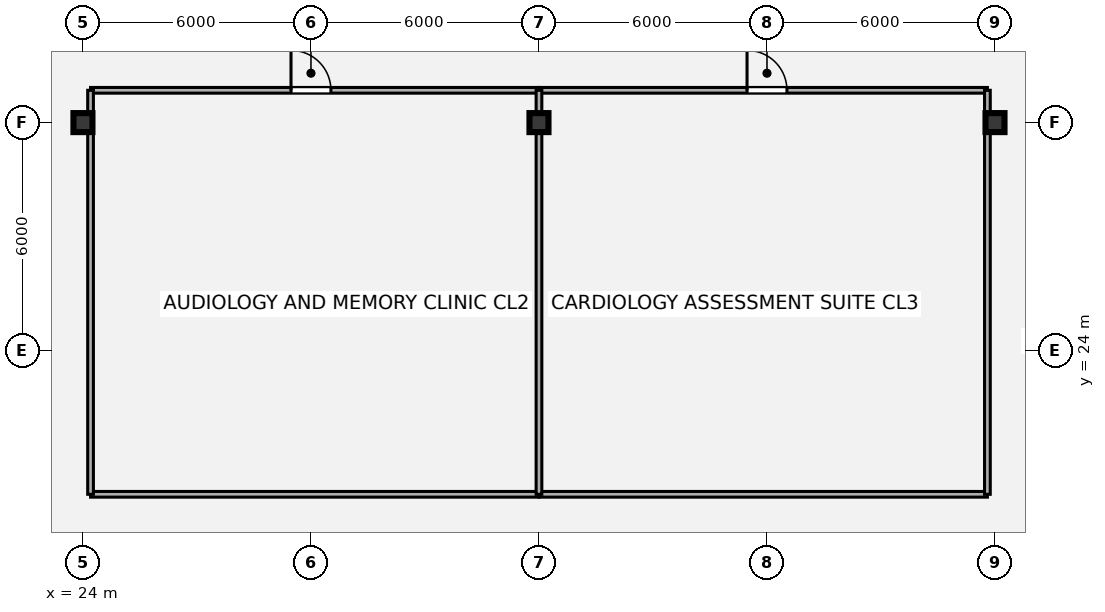
"""IFC4 building model, lengths in metres.
Left out: names, types, materials, properties, quantities, classifications, styles, units other than length and angle.
Written with IfcOpenShell. Run it as: python <this file> out.ifc"""

import sys

from ifc_helpers import new_model, si_unit, direction, frame, frame_2d, origin, origin_2d, place, context, subcontext, project, spatial, rectangle, i_section, extrude, source, transform, mapped, element, fill, save


model = new_model("IFC4")
c1 = context("Model", 3, precision=1e-05, world=origin(), true_north=direction((0.0, 1.0)))
c2 = subcontext(c1, "Body", "Model", "MODEL_VIEW")
j1 = project(units=[si_unit("LENGTHUNIT", "METRE"), si_unit("PLANEANGLEUNIT", "RADIAN")], contexts=[c1])
p1 = place(None, origin())
s1 = spatial("IfcSite", under=j1, at=p1, CompositionType="ELEMENT")
p2 = place(p1, origin())
s2 = spatial("IfcBuilding", under=s1, at=p2, CompositionType="ELEMENT")
p3 = place(p2, frame((0.0, 0.0, 5.4)))
s3 = spatial("IfcBuildingStorey", under=s2, at=p3, CompositionType="ELEMENT", Elevation=5.4)
m1 = source(origin(), c2, "Body", "SweptSolid", [
    extrude(i_section(OverallWidth=0.5, OverallDepth=0.5, WebThickness=0.028, FlangeThickness=0.045, at=origin_2d()), origin(), (0.0, 0.0, 1.0), 4.32),
])
for number, where, z_axis, x_axis in (
    (1, (24.0, 30.0, 0.0), (0.0, 0.0, 1.0), (1.0, 0.0, 0.0)),
    (2, (36.0, 30.0, 0.0), (0.0, 0.0, 1.0), (1.0, 0.0, 0.0)),
    (3, (48.0, 30.0, 0.0), (0.0, 0.0, 1.0), (1.0, 0.0, 0.0)),
):
    element("IfcColumn", number, at=place(p3, frame(where, z_axis=z_axis, x_axis=x_axis)), inside=s3, PredefinedType="COLUMN", context=c2, shape_type="MappedRepresentation", body=[
        mapped(m1, transform((0.0, 0.0, 0.0), x_axis=(1.0, 0.0, 0.0), y_axis=(0.0, 1.0, 0.0), z_axis=(0.0, 0.0, 1.0), scale=1.0)),
    ])
for number, where, z_axis, x_axis in (
    (4, (24.2, 20.22, 0.0), (0.0, 0.0, 1.0), (1.0, 0.0, 0.0)),
    (5, (36.0, 20.22, 0.0), (0.0, 0.0, 1.0), (1.0, 0.0, 0.0)),
):
    element("IfcWall", number, at=place(p3, frame(where, z_axis=z_axis, x_axis=x_axis)), inside=s3, PredefinedType="PARTITIONING", context=c2, shape_type="SweptSolid", body=[
        extrude(rectangle(XDim=11.8, YDim=0.15, at=frame_2d((5.9, 0.0))), origin(), (0.0, 0.0, 1.0), 4.01),
    ])
p4 = place(p3, frame((24.2, 30.85, 0.0), z_axis=(0.0, 0.0, 1.0), x_axis=(1.0, 0.0, 0.0)))
e6 = element("IfcWall", 6, at=p4, inside=s3, PredefinedType="PARTITIONING", context=c2, shape_type="SweptSolid", body=[
    extrude(rectangle(XDim=11.8, YDim=0.15, at=frame_2d((5.9, 0.0))), origin(), (0.0, 0.0, 1.0), 4.01),
])
p5 = place(p4, frame((5.275, 0.0, 0.0)))
e7 = element("IfcOpeningElement", 7, at=p5, cuts=e6, PredefinedType="OPENING", context=c2, shape_type="SweptSolid", body=[
    extrude(rectangle(XDim=1.05, YDim=2.1, at=origin_2d()), frame((0.525, 0.085, 1.05), z_axis=(0.0, -1.0, 0.0), x_axis=(1.0, 0.0, 0.0)), (0.0, 0.0, 1.0), 0.17),
])
p6 = place(p3, frame((36.0, 30.85, 0.0), z_axis=(0.0, 0.0, 1.0), x_axis=(1.0, 0.0, 0.0)))
e8 = element("IfcWall", 8, at=p6, inside=s3, PredefinedType="PARTITIONING", context=c2, shape_type="SweptSolid", body=[
    extrude(rectangle(XDim=11.8, YDim=0.15, at=frame_2d((5.9, 0.0))), origin(), (0.0, 0.0, 1.0), 4.01),
])
p7 = place(p6, frame((5.475, 0.0, 0.0)))
e9 = element("IfcOpeningElement", 9, at=p7, cuts=e8, PredefinedType="OPENING", context=c2, shape_type="SweptSolid", body=[
    extrude(rectangle(XDim=1.05, YDim=2.1, at=origin_2d()), frame((0.525, 0.085, 1.05), z_axis=(0.0, -1.0, 0.0), x_axis=(1.0, 0.0, 0.0)), (0.0, 0.0, 1.0), 0.17),
])
for number, where, z_axis, x_axis in (
    (10, (24.2, 20.22, 0.0), (0.0, 0.0, 1.0), (0.0, 1.0, 0.0)),
    (11, (36.0, 20.22, 0.0), (0.0, 0.0, 1.0), (0.0, 1.0, 0.0)),
    (12, (47.8, 20.22, 0.0), (0.0, 0.0, 1.0), (0.0, 1.0, 0.0)),
):
    element("IfcWall", number, at=place(p3, frame(where, z_axis=z_axis, x_axis=x_axis)), inside=s3, PredefinedType="PARTITIONING", context=c2, shape_type="SweptSolid", body=[
        extrude(rectangle(XDim=10.63, YDim=0.15, at=frame_2d((5.315, 0.0))), origin(), (0.0, 0.0, 1.0), 3.225),
    ])
m2 = source(origin(), c2, "Body", "SweptSolid", [
    extrude(rectangle(XDim=1.05, YDim=2.1, at=origin_2d()), frame((0.525, 0.025, 1.05), z_axis=(0.0, -1.0, 0.0), x_axis=(1.0, 0.0, 0.0)), (0.0, 0.0, 1.0), 0.05),
])
p8 = place(p5, origin())
e13 = element("IfcDoor", 13, at=p8, inside=s3, OperationType="SINGLE_SWING_LEFT", PredefinedType="DOOR", context=c2, shape_type="MappedRepresentation", body=[
    mapped(m2, transform((0.0, 0.0, 0.0), x_axis=(1.0, 0.0, 0.0), y_axis=(0.0, 1.0, 0.0), z_axis=(0.0, 0.0, 1.0), scale=1.0)),
])
fill(e7, e13)
p9 = place(p7, origin())
e14 = element("IfcDoor", 14, at=p9, inside=s3, OperationType="SINGLE_SWING_LEFT", PredefinedType="DOOR", context=c2, shape_type="MappedRepresentation", body=[
    mapped(m2, transform((0.0, 0.0, 0.0), x_axis=(1.0, 0.0, 0.0), y_axis=(0.0, 1.0, 0.0), z_axis=(0.0, 0.0, 1.0), scale=1.0)),
])
fill(e9, e14)
save(model, sys.argv[1])
